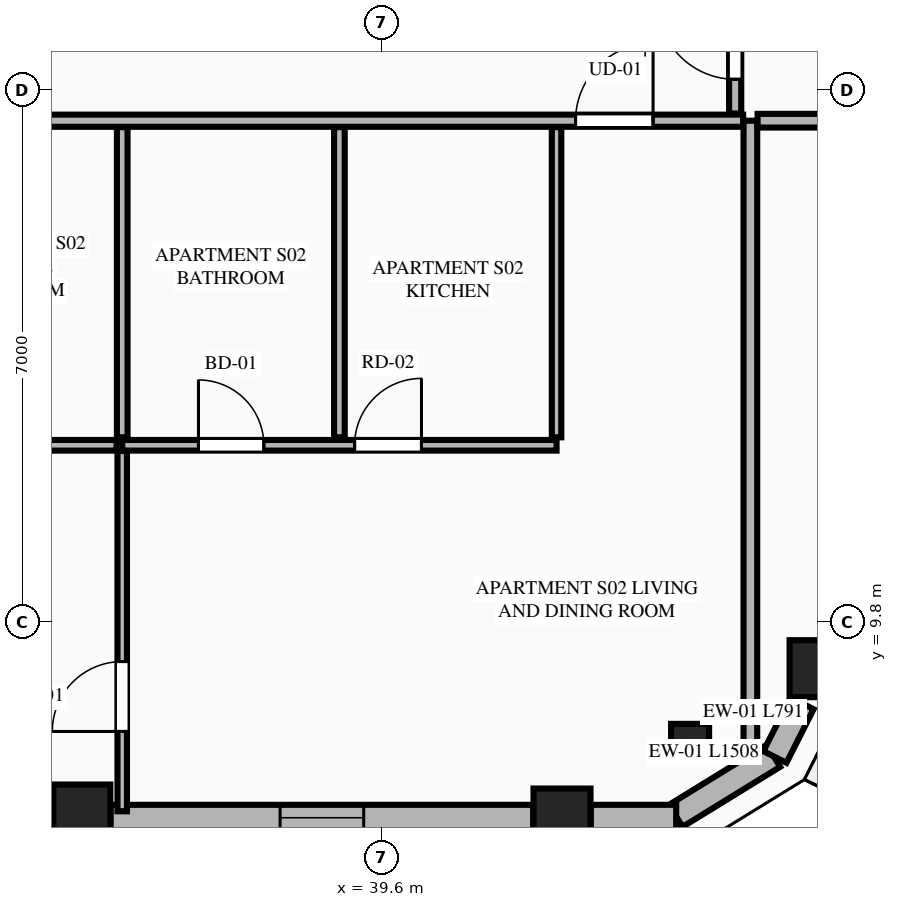
"""IFC4 building model, lengths in metres.
Left out: names, types, materials, properties, quantities, classifications, styles, units other than length and angle.
Written with IfcOpenShell. Run it as: python <this file> out.ifc"""

import sys

from ifc_helpers import new_model, si_unit, direction, frame, frame_2d, origin, origin_2d, place, context, subcontext, project, spatial, rectangle, extrude, element, fill, save


model = new_model("IFC4")
c1 = context("Model", 3, precision=1e-05, world=origin(), true_north=direction((0.0, 1.0)))
c2 = subcontext(c1, "Body", "Model", "MODEL_VIEW")
j1 = project(units=[si_unit("LENGTHUNIT", "METRE"), si_unit("PLANEANGLEUNIT", "RADIAN")], contexts=[c1])
p1 = place(None, origin())
s1 = spatial("IfcSite", under=j1, at=p1, CompositionType="ELEMENT")
p2 = place(p1, origin())
s2 = spatial("IfcBuilding", under=s1, at=p2, CompositionType="ELEMENT")
p3 = place(p2, frame((0.0, 0.0, 234.3)))
s3 = spatial("IfcBuildingStorey", under=s2, at=p3, CompositionType="ELEMENT", Elevation=234.3)
for number, where, z_axis, x_axis in (
    (1, (35.654, 7.292, 0.0), (0.0, 0.0, 1.0), (1.0, 0.0, 0.0)),
    (2, (41.972, 7.239, 0.0), (0.0, 0.0, 1.0), (1.0, 0.0, 0.0)),
    (3, (45.341, 9.191, 0.0), (0.0, 0.0, 1.0), (1.0, 0.0, 0.0)),
):
    element("IfcColumn", number, at=place(p3, frame(where, z_axis=z_axis, x_axis=x_axis)), inside=s3, PredefinedType="COLUMN", context=c2, shape_type="SweptSolid", body=[
        extrude(rectangle(XDim=0.75, YDim=0.75, at=origin_2d()), origin(), (0.0, 0.0, 1.0), 3.65),
    ])
p4 = place(p3, frame((43.657, 8.215, 0.0), z_axis=(0.0, 0.0, 1.0), x_axis=(0.865256437757, 0.501329529272, 0.0)))
e4 = element("IfcColumn", 4, at=p4, inside=s3, PredefinedType="PILASTER", context=c2, shape_type="SweptSolid", body=[
    extrude(rectangle(XDim=0.5, YDim=0.35, at=origin_2d()), origin(), (0.0, 0.0, 1.0), 3.65),
])
p5 = place(p3, frame((43.469, 7.255, 0.0), z_axis=(0.0, 0.0, 1.0), x_axis=(0.851680557619, 0.52406128246, 0.0)))
e5 = element("IfcWall", 5, at=p5, inside=s3, PredefinedType="STANDARD", context=c2, shape_type="SweptSolid", body=[
    extrude(rectangle(XDim=1.508, YDim=0.34, at=frame_2d((0.754, 0.0))), origin(), (0.0, 0.0, 1.0), 3.45),
])
p6 = place(p3, frame((29.525, 7.23, 0.0), z_axis=(0.0, 0.0, 1.0), x_axis=(1.0, 0.0, 0.0)))
e6 = element("IfcWall", 6, at=p6, inside=s3, PredefinedType="STANDARD", context=c2, shape_type="SweptSolid", body=[
    extrude(rectangle(XDim=5.75, YDim=0.34, at=frame_2d((2.875, 0.0))), origin(), (0.0, 0.0, 1.0), 2.983),
])
p7 = place(p6, frame((2.325, 0.0, 0.0)))
e7 = element("IfcOpeningElement", 7, at=p7, cuts=e6, PredefinedType="OPENING", context=c2, shape_type="SweptSolid", body=[
    extrude(rectangle(XDim=1.1, YDim=2.25, at=frame_2d((0.55, 1.125))), frame((0.0, 0.18, 0.0), z_axis=(0.0, -1.0, 0.0), x_axis=(1.0, 0.0, 0.0)), (0.0, 0.0, 1.0), 0.36),
])
p8 = place(p3, frame((36.033, 7.23, 0.0), z_axis=(0.0, 0.0, 1.0), x_axis=(1.0, 0.0, 0.0)))
e8 = element("IfcWall", 8, at=p8, inside=s3, PredefinedType="STANDARD", context=c2, shape_type="SweptSolid", body=[
    extrude(rectangle(XDim=5.56, YDim=0.34, at=frame_2d((2.78, 0.0))), origin(), (0.0, 0.0, 1.0), 2.983),
])
p9 = place(p8, frame((2.23, 0.0, 0.75)))
e9 = element("IfcOpeningElement", 9, at=p9, cuts=e8, PredefinedType="OPENING", context=c2, shape_type="SweptSolid", body=[
    extrude(rectangle(XDim=1.1, YDim=2.0, at=frame_2d((0.55, 1.0))), frame((0.0, 0.18, 0.0), z_axis=(0.0, -1.0, 0.0), x_axis=(1.0, 0.0, 0.0)), (0.0, 0.0, 1.0), 0.36),
])
p10 = place(p3, frame((42.351, 7.23, 0.0), z_axis=(0.0, 0.0, 1.0), x_axis=(1.0, 0.0, 0.0)))
e10 = element("IfcWall", 10, at=p10, inside=s3, PredefinedType="STANDARD", context=c2, shape_type="SweptSolid", body=[
    extrude(rectangle(XDim=1.123, YDim=0.34, at=frame_2d((0.562, 0.0))), origin(), (0.0, 0.0, 1.0), 3.45),
])
p11 = place(p3, frame((44.773, 8.029, 0.0), z_axis=(0.0, 0.0, 1.0), x_axis=(0.451159191899, 0.892443490404, 0.0)))
e11 = element("IfcWall", 11, at=p11, inside=s3, PredefinedType="STANDARD", context=c2, shape_type="SweptSolid", body=[
    extrude(rectangle(XDim=0.791, YDim=0.34, at=frame_2d((0.396, 0.0))), origin(), (0.0, 0.0, 1.0), 3.45),
])
p12 = place(p3, frame((44.45, 8.119, 0.0), z_axis=(0.0, 0.0, 1.0), x_axis=(0.0, 1.0, 0.0)))
e12 = element("IfcWall", 12, at=p12, inside=s3, PredefinedType="PARTITIONING", context=c2, shape_type="SweptSolid", body=[
    extrude(rectangle(XDim=8.281, YDim=0.18, at=frame_2d((4.141, 0.0))), origin(), (0.0, 0.0, 1.0), 3.45),
])
p13 = place(p3, frame((29.241, 16.4, 0.0), z_axis=(0.0, 0.0, 1.0), x_axis=(1.0, 0.0, 0.0)))
e13 = element("IfcWall", 13, at=p13, inside=s3, PredefinedType="PARTITIONING", context=c2, shape_type="SweptSolid", body=[
    extrude(rectangle(XDim=15.114, YDim=0.16, at=frame_2d((7.557, 0.0))), origin(), (0.0, 0.0, 1.0), 3.45),
])
p14 = place(p13, frame((12.909, 0.0, 0.0)))
e14 = element("IfcOpeningElement", 14, at=p14, cuts=e13, PredefinedType="OPENING", context=c2, shape_type="SweptSolid", body=[
    extrude(rectangle(XDim=1.02, YDim=2.25, at=frame_2d((0.51, 1.125))), frame((0.0, 0.09, 0.0), z_axis=(0.0, -1.0, 0.0), x_axis=(1.0, 0.0, 0.0)), (0.0, 0.0, 1.0), 0.18),
])
p15 = place(p3, frame((41.9, 12.235, 0.0), z_axis=(0.0, 0.0, 1.0), x_axis=(0.0, 1.0, 0.0)))
e15 = element("IfcWall", 15, at=p15, inside=s3, PredefinedType="PARTITIONING", context=c2, shape_type="SweptSolid", body=[
    extrude(rectangle(XDim=4.08, YDim=0.125, at=frame_2d((2.04, 0.0))), origin(), (0.0, 0.0, 1.0), 2.907),
])
p16 = place(p3, frame((36.186, 12.13, 0.0), z_axis=(0.0, 0.0, 1.0), x_axis=(1.0, 0.0, 0.0)))
e16 = element("IfcWall", 16, at=p16, inside=s3, PredefinedType="PLUMBINGWALL", context=c2, shape_type="SweptSolid", body=[
    extrude(rectangle(XDim=5.714, YDim=0.14, at=frame_2d((2.857, 0.0))), origin(), (0.0, 0.0, 1.0), 3.45),
])
p17 = place(p16, frame((1.003, 0.0, 0.0)))
e17 = element("IfcOpeningElement", 17, at=p17, cuts=e16, PredefinedType="OPENING", context=c2, shape_type="SweptSolid", body=[
    extrude(rectangle(XDim=0.86, YDim=2.1, at=frame_2d((0.43, 1.05))), frame((0.0, 0.08, 0.0), z_axis=(0.0, -1.0, 0.0), x_axis=(1.0, 0.0, 0.0)), (0.0, 0.0, 1.0), 0.16),
])
p18 = place(p16, frame((3.057, 0.0, 0.0)))
e18 = element("IfcOpeningElement", 18, at=p18, cuts=e16, PredefinedType="OPENING", context=c2, shape_type="SweptSolid", body=[
    extrude(rectangle(XDim=0.88, YDim=2.15, at=frame_2d((0.44, 1.075))), frame((0.0, 0.08, 0.0), z_axis=(0.0, -1.0, 0.0), x_axis=(1.0, 0.0, 0.0)), (0.0, 0.0, 1.0), 0.16),
])
p19 = place(p3, frame((29.241, 12.13, 0.0), z_axis=(0.0, 0.0, 1.0), x_axis=(1.0, 0.0, 0.0)))
e19 = element("IfcWall", 19, at=p19, inside=s3, PredefinedType="PLUMBINGWALL", context=c2, shape_type="SweptSolid", body=[
    extrude(rectangle(XDim=6.87, YDim=0.14, at=frame_2d((3.435, 0.0))), origin(), (0.0, 0.0, 1.0), 3.45),
])
p20 = place(p19, frame((0.28, 0.0, 0.0)))
e20 = element("IfcOpeningElement", 20, at=p20, cuts=e19, PredefinedType="OPENING", context=c2, shape_type="SweptSolid", body=[
    extrude(rectangle(XDim=0.88, YDim=2.15, at=frame_2d((0.44, 1.075))), frame((0.0, 0.08, 0.0), z_axis=(0.0, -1.0, 0.0), x_axis=(1.0, 0.0, 0.0)), (0.0, 0.0, 1.0), 0.16),
])
p21 = place(p19, frame((4.352, 0.0, 0.0)))
e21 = element("IfcOpeningElement", 21, at=p21, cuts=e19, PredefinedType="OPENING", context=c2, shape_type="SweptSolid", body=[
    extrude(rectangle(XDim=0.86, YDim=2.1, at=frame_2d((0.43, 1.05))), frame((0.0, 0.08, 0.0), z_axis=(0.0, -1.0, 0.0), x_axis=(1.0, 0.0, 0.0)), (0.0, 0.0, 1.0), 0.16),
])
for number, where, z_axis, x_axis in (
    (22, (39.043, 12.235, 0.0), (0.0, 0.0, 1.0), (0.0, 1.0, 0.0)),
    (23, (36.186, 12.235, 0.0), (0.0, 0.0, 1.0), (0.0, 1.0, 0.0)),
):
    element("IfcWall", number, at=place(p3, frame(where, z_axis=z_axis, x_axis=x_axis)), inside=s3, PredefinedType="PLUMBINGWALL", context=c2, shape_type="SweptSolid", body=[
        extrude(rectangle(XDim=4.08, YDim=0.14, at=frame_2d((2.04, 0.0))), origin(), (0.0, 0.0, 1.0), 3.45),
    ])
p22 = place(p3, frame((36.186, 7.315, 0.0), z_axis=(0.0, 0.0, 1.0), x_axis=(0.0, 1.0, 0.0)))
e24 = element("IfcWall", 24, at=p22, inside=s3, PredefinedType="PARTITIONING", context=c2, shape_type="SweptSolid", body=[
    extrude(rectangle(XDim=4.74, YDim=0.125, at=frame_2d((2.37, 0.0))), origin(), (0.0, 0.0, 1.0), 3.45),
])
p23 = place(p22, frame((1.05, 0.0, 0.0)))
e25 = element("IfcOpeningElement", 25, at=p23, cuts=e24, PredefinedType="OPENING", context=c2, shape_type="SweptSolid", body=[
    extrude(rectangle(XDim=0.92, YDim=2.15, at=frame_2d((0.46, 1.075))), frame((0.0, 0.073, 0.0), z_axis=(0.0, -1.0, 0.0), x_axis=(1.0, 0.0, 0.0)), (0.0, 0.0, 1.0), 0.145),
])
p24 = place(p3, frame((44.545, 16.4, 0.0), z_axis=(0.0, 0.0, 1.0), x_axis=(1.0, 0.0, 0.0)))
e26 = element("IfcWall", 26, at=p24, inside=s3, PredefinedType="PARTITIONING", context=c2, shape_type="SweptSolid", body=[
    extrude(rectangle(XDim=4.221, YDim=0.18, at=frame_2d((2.111, 0.0))), origin(), (0.0, 0.0, 1.0), 3.45),
])
p25 = place(p3, frame((44.25, 16.495, 0.0), z_axis=(0.0, 0.0, 1.0), x_axis=(0.0, 1.0, 0.0)))
e27 = element("IfcWall", 27, at=p25, inside=s3, PredefinedType="PARTITIONING", context=c2, shape_type="SweptSolid", body=[
    extrude(rectangle(XDim=18.41, YDim=0.16, at=frame_2d((9.205, 0.0))), origin(), (0.0, 0.0, 1.0), 3.137),
])
p26 = place(p25, frame((0.45, 0.0, 0.0)))
e28 = element("IfcOpeningElement", 28, at=p26, cuts=e27, PredefinedType="OPENING", context=c2, shape_type="SweptSolid", body=[
    extrude(rectangle(XDim=1.02, YDim=2.25, at=frame_2d((0.51, 1.125))), frame((0.0, 0.09, 0.0), z_axis=(0.0, -1.0, 0.0), x_axis=(1.0, 0.0, 0.0)), (0.0, 0.0, 1.0), 0.18),
])
p27 = place(p9, origin())
e29 = element("IfcWindow", 29, at=p27, inside=s3, PartitioningType="SINGLE_PANEL", PredefinedType="WINDOW", context=c2, shape_type="SweptSolid", body=[
    extrude(rectangle(XDim=1.1, YDim=2.0, at=frame_2d((0.55, 1.0))), frame((0.0, 0.03, 0.0), z_axis=(0.0, -1.0, 0.0), x_axis=(1.0, 0.0, 0.0)), (0.0, 0.0, 1.0), 0.06),
])
fill(e9, e29)
p28 = place(p17, origin())
e30 = element("IfcDoor", 30, at=p28, inside=s3, OperationType="SINGLE_SWING_LEFT", PredefinedType="DOOR", context=c2, shape_type="SweptSolid", body=[
    extrude(rectangle(XDim=0.86, YDim=2.1, at=frame_2d((0.43, 1.05))), frame((0.0, 0.025, 0.0), z_axis=(0.0, -1.0, 0.0), x_axis=(1.0, 0.0, 0.0)), (0.0, 0.0, 1.0), 0.05),
])
fill(e17, e30)
p29 = place(p14, origin())
e31 = element("IfcDoor", 31, at=p29, inside=s3, OperationType="SINGLE_SWING_RIGHT", PredefinedType="DOOR", context=c2, shape_type="SweptSolid", body=[
    extrude(rectangle(XDim=1.02, YDim=2.25, at=frame_2d((0.51, 1.125))), frame((0.0, 0.025, 0.0), z_axis=(0.0, -1.0, 0.0), x_axis=(1.0, 0.0, 0.0)), (0.0, 0.0, 1.0), 0.05),
])
fill(e14, e31)
p30 = place(p18, origin())
e32 = element("IfcDoor", 32, at=p30, inside=s3, OperationType="SINGLE_SWING_RIGHT", PredefinedType="DOOR", context=c2, shape_type="SweptSolid", body=[
    extrude(rectangle(XDim=0.88, YDim=2.15, at=frame_2d((0.44, 1.075))), frame((0.0, 0.025, 0.0), z_axis=(0.0, -1.0, 0.0), x_axis=(1.0, 0.0, 0.0)), (0.0, 0.0, 1.0), 0.05),
])
fill(e18, e32)
p31 = place(p23, origin())
e33 = element("IfcDoor", 33, at=p31, inside=s3, OperationType="SINGLE_SWING_LEFT", PredefinedType="DOOR", context=c2, shape_type="SweptSolid", body=[
    extrude(rectangle(XDim=0.92, YDim=2.15, at=frame_2d((0.46, 1.075))), frame((0.0, 0.025, 0.0), z_axis=(0.0, -1.0, 0.0), x_axis=(1.0, 0.0, 0.0)), (0.0, 0.0, 1.0), 0.05),
])
fill(e25, e33)
p32 = place(p26, origin())
e34 = element("IfcDoor", 34, at=p32, inside=s3, OperationType="SINGLE_SWING_RIGHT", PredefinedType="DOOR", context=c2, shape_type="SweptSolid", body=[
    extrude(rectangle(XDim=1.02, YDim=2.25, at=frame_2d((0.51, 1.125))), frame((0.0, 0.025, 0.0), z_axis=(0.0, -1.0, 0.0), x_axis=(1.0, 0.0, 0.0)), (0.0, 0.0, 1.0), 0.05),
])
fill(e28, e34)
save(model, sys.argv[1])
